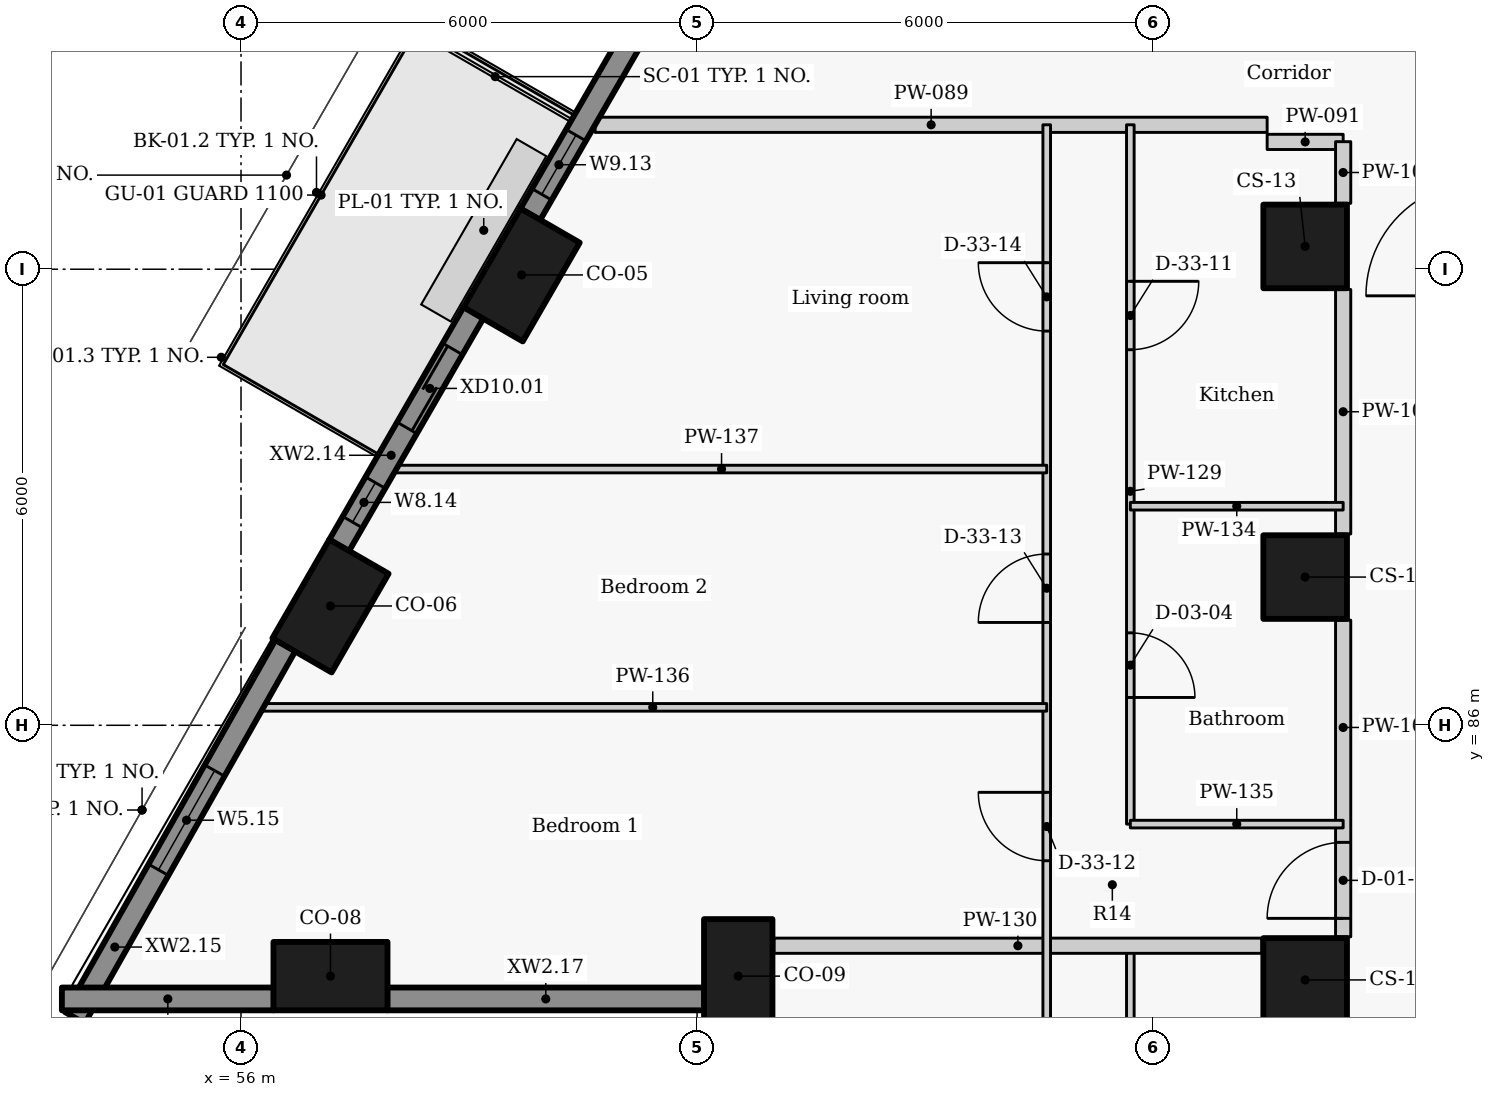
"""IFC4 building model, lengths in metres.
Left out: names, types, materials, properties, quantities, classifications, styles, units other than length and angle.
Written with IfcOpenShell. Run it as: python <this file> out.ifc"""

import sys

from ifc_helpers import new_model, si_unit, direction, frame, frame_2d, origin, origin_2d, place, context, subcontext, project, spatial, rectangle, extrude, element, fill, save


model = new_model("IFC4")
c1 = context("Model", 3, precision=1e-05, world=origin(), true_north=direction((0.0, 1.0)))
c2 = subcontext(c1, "Body", "Model", "MODEL_VIEW")
j1 = project(units=[si_unit("LENGTHUNIT", "METRE"), si_unit("PLANEANGLEUNIT", "RADIAN")], contexts=[c1])
p1 = place(None, origin())
s1 = spatial("IfcSite", under=j1, at=p1, CompositionType="ELEMENT")
p2 = place(p1, origin())
s2 = spatial("IfcBuilding", under=s1, at=p2, CompositionType="ELEMENT")
p3 = place(p2, frame((0.0, 0.0, 44.7)))
s3 = spatial("IfcBuildingStorey", under=s2, at=p3, CompositionType="ELEMENT", Elevation=44.7)
for number, where, z_axis, x_axis in (
    (1, (59.692, 91.925, 0.0), (0.0, 0.0, 1.0), (-0.5, -0.866, 0.0)),
    (2, (57.177, 87.57, 0.0), (0.0, 0.0, 1.0), (-0.5, -0.866, 0.0)),
    (3, (57.177, 82.7, 0.0), (0.0, 0.0, 1.0), (1.0, 0.0, 0.0)),
    (4, (62.542, 82.7, 0.0), (0.0, 0.0, 1.0), (0.0, -1.0, 0.0)),
):
    element("IfcColumn", number, at=place(p3, frame(where, z_axis=z_axis, x_axis=x_axis)), inside=s3, PredefinedType="COLUMN", context=c2, shape_type="SweptSolid", body=[
        extrude(rectangle(XDim=1.5, YDim=0.9, at=origin_2d()), origin(), (0.0, 0.0, 1.0), 3.3),
    ])
for number, where, z_axis, x_axis in (
    (5, (70.0, 92.3, 0.0), (0.0, 0.0, 1.0), (0.0, -1.0, 0.0)),
    (6, (70.0, 87.95, 0.0), (0.0, 0.0, 1.0), (0.0, -1.0, 0.0)),
    (7, (70.0, 82.65, 0.0), (0.0, 0.0, 1.0), (0.0, -1.0, 0.0)),
):
    element("IfcColumn", number, at=place(p3, frame(where, z_axis=z_axis, x_axis=x_axis)), inside=s3, PredefinedType="COLUMN", context=c2, shape_type="SweptSolid", body=[
        extrude(rectangle(XDim=1.1, YDim=1.1, at=origin_2d()), origin(), (0.0, 0.0, 1.0), 3.3),
    ])
p4 = place(p3, frame((61.722, 96.041, 0.0), z_axis=(0.0, 0.0, 1.0), x_axis=(-0.500001735503, -0.866024401789, 0.0)))
e8 = element("IfcWall", 8, at=p4, inside=s3, PredefinedType="SOLIDWALL", context=c2, shape_type="SweptSolid", body=[
    extrude(rectangle(XDim=3.834, YDim=0.3, at=frame_2d((1.917, 0.0))), origin(), (0.0, 0.0, 1.0), 2.425),
])
p5 = place(p4, frame((2.629, 0.0, 0.9)))
e9 = element("IfcOpeningElement", 9, at=p5, cuts=e8, PredefinedType="OPENING", context=c2, shape_type="SweptSolid", body=[
    extrude(rectangle(XDim=0.9, YDim=1.1, at=frame_2d((0.45, 0.55))), frame((0.0, 0.16, 0.0), z_axis=(0.0, -1.0, 0.0), x_axis=(1.0, 0.0, 0.0)), (0.0, 0.0, 1.0), 0.32),
])
p6 = place(p3, frame((59.059, 91.429, 0.0), z_axis=(0.0, 0.0, 1.0), x_axis=(-0.499977402622, -0.866038449993, 0.0)))
e10 = element("IfcWall", 10, at=p6, inside=s3, PredefinedType="SOLIDWALL", context=c2, shape_type="SweptSolid", body=[
    extrude(rectangle(XDim=3.537, YDim=0.3, at=frame_2d((1.769, 0.0))), origin(), (0.0, 0.0, 1.0), 2.425),
])
p7 = place(p6, frame((0.551, 0.0, 0.0)))
e11 = element("IfcOpeningElement", 11, at=p7, cuts=e10, PredefinedType="OPENING", context=c2, shape_type="SweptSolid", body=[
    extrude(rectangle(XDim=1.2, YDim=2.0, at=frame_2d((0.6, 1.0))), frame((0.0, 0.16, 0.0), z_axis=(0.0, -1.0, 0.0), x_axis=(1.0, 0.0, 0.0)), (0.0, 0.0, 1.0), 0.32),
])
p8 = place(p6, frame((2.582, 0.0, 0.9)))
e12 = element("IfcOpeningElement", 12, at=p8, cuts=e10, PredefinedType="OPENING", context=c2, shape_type="SweptSolid", body=[
    extrude(rectangle(XDim=0.6, YDim=1.1, at=frame_2d((0.3, 0.55))), frame((0.0, 0.16, 0.0), z_axis=(0.0, -1.0, 0.0), x_axis=(1.0, 0.0, 0.0)), (0.0, 0.0, 1.0), 0.32),
])
p9 = place(p3, frame((56.584, 87.051, 0.0), z_axis=(0.0, 0.0, 1.0), x_axis=(-0.492363204642, -0.870389840655, 0.0)))
e13 = element("IfcWall", 13, at=p9, inside=s3, PredefinedType="SOLIDWALL", context=c2, shape_type="SweptSolid", body=[
    extrude(rectangle(XDim=5.626, YDim=0.3, at=frame_2d((2.813, 0.0))), origin(), (0.0, 0.0, 1.0), 2.425),
])
p10 = place(p9, frame((1.892, 0.0, 0.9)))
e14 = element("IfcOpeningElement", 14, at=p10, cuts=e13, PredefinedType="OPENING", context=c2, shape_type="SweptSolid", body=[
    extrude(rectangle(XDim=1.5, YDim=1.1, at=frame_2d((0.75, 0.55))), frame((0.0, 0.16, 0.0), z_axis=(0.0, -1.0, 0.0), x_axis=(1.0, 0.0, 0.0)), (0.0, 0.0, 1.0), 0.32),
])
p11 = place(p3, frame((53.643, 82.4, 0.0), z_axis=(0.0, 0.0, 1.0), x_axis=(1.0, 0.0, 0.0)))
e15 = element("IfcWall", 15, at=p11, inside=s3, PredefinedType="SOLIDWALL", context=c2, shape_type="SweptSolid", body=[
    extrude(rectangle(XDim=2.788, YDim=0.3, at=frame_2d((1.394, 0.0))), origin(), (0.0, 0.0, 1.0), 2.425),
])
p12 = place(p3, frame((57.923, 82.4, 0.0), z_axis=(0.0, 0.0, 1.0), x_axis=(1.0, 0.0, 0.0)))
e16 = element("IfcWall", 16, at=p12, inside=s3, PredefinedType="SOLIDWALL", context=c2, shape_type="SweptSolid", body=[
    extrude(rectangle(XDim=4.173, YDim=0.3, at=frame_2d((2.086, 0.0))), origin(), (0.0, 0.0, 1.0), 2.425),
])
p13 = place(p3, frame((60.659, 93.9, 0.0), z_axis=(0.0, 0.0, 1.0), x_axis=(1.0, 0.0, 0.0)))
e17 = element("IfcWall", 17, at=p13, inside=s3, PredefinedType="PARTITIONING", context=c2, shape_type="SweptSolid", body=[
    extrude(rectangle(XDim=8.841, YDim=0.2, at=frame_2d((4.421, 0.0))), origin(), (0.0, 0.0, 1.0), 2.405),
])
p14 = place(p3, frame((69.5, 93.675, 0.0), z_axis=(0.0, 0.0, 1.0), x_axis=(1.0, 0.0, 0.0)))
e18 = element("IfcWall", 18, at=p14, inside=s3, PredefinedType="PARTITIONING", context=c2, shape_type="SweptSolid", body=[
    extrude(rectangle(XDim=1.0, YDim=0.2, at=frame_2d((0.5, 0.0))), origin(), (0.0, 0.0, 1.0), 2.505),
])
p15 = place(p3, frame((70.5, 83.217, 0.0), z_axis=(0.0, 0.0, 1.0), x_axis=(0.0, 1.0, 0.0)))
e19 = element("IfcWall", 19, at=p15, inside=s3, PredefinedType="PARTITIONING", context=c2, shape_type="SweptSolid", body=[
    extrude(rectangle(XDim=4.166, YDim=0.2, at=frame_2d((2.083, 0.0))), origin(), (0.0, 0.0, 1.0), 3.025),
])
p16 = place(p15, frame((0.243, 0.0, 0.0)))
e20 = element("IfcOpeningElement", 20, at=p16, cuts=e19, PredefinedType="OPENING", context=c2, shape_type="SweptSolid", body=[
    extrude(rectangle(XDim=1.0, YDim=2.1, at=frame_2d((0.5, 1.05))), frame((0.0, 0.11, 0.0), z_axis=(0.0, -1.0, 0.0), x_axis=(1.0, 0.0, 0.0)), (0.0, 0.0, 1.0), 0.22),
])
p17 = place(p3, frame((70.5, 88.517, 0.0), z_axis=(0.0, 0.0, 1.0), x_axis=(0.0, 1.0, 0.0)))
e21 = element("IfcWall", 21, at=p17, inside=s3, PredefinedType="PARTITIONING", context=c2, shape_type="SweptSolid", body=[
    extrude(rectangle(XDim=3.216, YDim=0.2, at=frame_2d((1.608, 0.0))), origin(), (0.0, 0.0, 1.0), 3.025),
])
p18 = place(p3, frame((70.5, 92.867, 0.0), z_axis=(0.0, 0.0, 1.0), x_axis=(0.0, 1.0, 0.0)))
e22 = element("IfcWall", 22, at=p18, inside=s3, PredefinedType="PARTITIONING", context=c2, shape_type="SweptSolid", body=[
    extrude(rectangle(XDim=0.811, YDim=0.2, at=frame_2d((0.406, 0.0))), origin(), (0.0, 0.0, 1.0), 3.025),
])
p19 = place(p3, frame((67.7, 83.1, 0.0), z_axis=(0.0, 0.0, 1.0), x_axis=(0.0, -1.0, 0.0)))
e23 = element("IfcWall", 23, at=p19, inside=s3, PredefinedType="PARTITIONING", context=c2, shape_type="SweptSolid", body=[
    extrude(rectangle(XDim=9.0, YDim=0.1, at=frame_2d((4.5, 0.0))), origin(), (0.0, 0.0, 1.0), 3.025),
])
p20 = place(p19, frame((6.53, 0.0, 0.0)))
e24 = element("IfcOpeningElement", 24, at=p20, cuts=e23, PredefinedType="OPENING", context=c2, shape_type="SweptSolid", body=[
    extrude(rectangle(XDim=0.85, YDim=2.1, at=frame_2d((0.425, 1.05))), frame((0.0, 0.06, 0.0), z_axis=(0.0, -1.0, 0.0), x_axis=(1.0, 0.0, 0.0)), (0.0, 0.0, 1.0), 0.12),
])
p21 = place(p19, frame((2.005, 0.0, 0.0)))
e25 = element("IfcOpeningElement", 25, at=p21, cuts=e23, PredefinedType="OPENING", context=c2, shape_type="SweptSolid", body=[
    extrude(rectangle(XDim=0.9, YDim=2.1, at=frame_2d((0.45, 1.05))), frame((0.0, 0.06, 0.0), z_axis=(0.0, -1.0, 0.0), x_axis=(1.0, 0.0, 0.0)), (0.0, 0.0, 1.0), 0.12),
])
p22 = place(p3, frame((67.7, 93.9, 0.0), z_axis=(0.0, 0.0, 1.0), x_axis=(0.0, -1.0, 0.0)))
e26 = element("IfcWall", 26, at=p22, inside=s3, PredefinedType="PARTITIONING", context=c2, shape_type="SweptSolid", body=[
    extrude(rectangle(XDim=9.2, YDim=0.1, at=frame_2d((4.6, 0.0))), origin(), (0.0, 0.0, 1.0), 3.025),
])
p23 = place(p22, frame((6.684, 0.0, 0.0)))
e27 = element("IfcOpeningElement", 27, at=p23, cuts=e26, PredefinedType="OPENING", context=c2, shape_type="SweptSolid", body=[
    extrude(rectangle(XDim=0.85, YDim=2.1, at=frame_2d((0.425, 1.05))), frame((0.0, 0.06, 0.0), z_axis=(0.0, -1.0, 0.0), x_axis=(1.0, 0.0, 0.0)), (0.0, 0.0, 1.0), 0.12),
])
p24 = place(p22, frame((2.059, 0.0, 0.0)))
e28 = element("IfcOpeningElement", 28, at=p24, cuts=e26, PredefinedType="OPENING", context=c2, shape_type="SweptSolid", body=[
    extrude(rectangle(XDim=0.9, YDim=2.1, at=frame_2d((0.45, 1.05))), frame((0.0, 0.06, 0.0), z_axis=(0.0, -1.0, 0.0), x_axis=(1.0, 0.0, 0.0)), (0.0, 0.0, 1.0), 0.12),
])
p25 = place(p3, frame((63.012, 83.1, 0.0), z_axis=(0.0, 0.0, 1.0), x_axis=(1.0, 0.0, 0.0)))
e29 = element("IfcWall", 29, at=p25, inside=s3, PredefinedType="PARTITIONING", context=c2, shape_type="SweptSolid", body=[
    extrude(rectangle(XDim=6.418, YDim=0.2, at=frame_2d((3.209, 0.0))), origin(), (0.0, 0.0, 1.0), 3.025),
])
p26 = place(p3, frame((66.6, 72.0, 0.0), z_axis=(0.0, 0.0, 1.0), x_axis=(0.0, 1.0, 0.0)))
e30 = element("IfcWall", 30, at=p26, inside=s3, PredefinedType="PARTITIONING", context=c2, shape_type="SweptSolid", body=[
    extrude(rectangle(XDim=21.9, YDim=0.1, at=frame_2d((10.95, 0.0))), origin(), (0.0, 0.0, 1.0), 3.025),
])
p27 = place(p26, frame((1.161, 0.0, 0.0)))
e31 = element("IfcOpeningElement", 31, at=p27, cuts=e30, PredefinedType="OPENING", context=c2, shape_type="SweptSolid", body=[
    extrude(rectangle(XDim=0.9, YDim=2.1, at=frame_2d((0.45, 1.05))), frame((0.0, 0.06, 0.0), z_axis=(0.0, -1.0, 0.0), x_axis=(1.0, 0.0, 0.0)), (0.0, 0.0, 1.0), 0.12),
])
p28 = place(p26, frame((4.384, 0.0, 0.0)))
e32 = element("IfcOpeningElement", 32, at=p28, cuts=e30, PredefinedType="OPENING", context=c2, shape_type="SweptSolid", body=[
    extrude(rectangle(XDim=0.9, YDim=2.1, at=frame_2d((0.45, 1.05))), frame((0.0, 0.06, 0.0), z_axis=(0.0, -1.0, 0.0), x_axis=(1.0, 0.0, 0.0)), (0.0, 0.0, 1.0), 0.12),
])
p29 = place(p26, frame((8.323, 0.0, 0.0)))
e33 = element("IfcOpeningElement", 33, at=p29, cuts=e30, PredefinedType="OPENING", context=c2, shape_type="SweptSolid", body=[
    extrude(rectangle(XDim=0.9, YDim=2.1, at=frame_2d((0.45, 1.05))), frame((0.0, 0.06, 0.0), z_axis=(0.0, -1.0, 0.0), x_axis=(1.0, 0.0, 0.0)), (0.0, 0.0, 1.0), 0.12),
])
p30 = place(p26, frame((12.218, 0.0, 0.0)))
e34 = element("IfcOpeningElement", 34, at=p30, cuts=e30, PredefinedType="OPENING", context=c2, shape_type="SweptSolid", body=[
    extrude(rectangle(XDim=0.9, YDim=2.1, at=frame_2d((0.45, 1.05))), frame((0.0, 0.06, 0.0), z_axis=(0.0, -1.0, 0.0), x_axis=(1.0, 0.0, 0.0)), (0.0, 0.0, 1.0), 0.12),
])
p31 = place(p26, frame((15.353, 0.0, 0.0)))
e35 = element("IfcOpeningElement", 35, at=p31, cuts=e30, PredefinedType="OPENING", context=c2, shape_type="SweptSolid", body=[
    extrude(rectangle(XDim=0.9, YDim=2.1, at=frame_2d((0.45, 1.05))), frame((0.0, 0.06, 0.0), z_axis=(0.0, -1.0, 0.0), x_axis=(1.0, 0.0, 0.0)), (0.0, 0.0, 1.0), 0.12),
])
p32 = place(p26, frame((19.186, 0.0, 0.0)))
e36 = element("IfcOpeningElement", 36, at=p32, cuts=e30, PredefinedType="OPENING", context=c2, shape_type="SweptSolid", body=[
    extrude(rectangle(XDim=0.9, YDim=2.1, at=frame_2d((0.45, 1.05))), frame((0.0, 0.06, 0.0), z_axis=(0.0, -1.0, 0.0), x_axis=(1.0, 0.0, 0.0)), (0.0, 0.0, 1.0), 0.12),
])
for number, where, z_axis, x_axis in (
    (37, (67.7, 88.882, 0.0), (0.0, 0.0, 1.0), (1.0, 0.0, 0.0)),
    (38, (67.7, 84.7, 0.0), (0.0, 0.0, 1.0), (1.0, 0.0, 0.0)),
):
    element("IfcWall", number, at=place(p3, frame(where, z_axis=z_axis, x_axis=x_axis)), inside=s3, PredefinedType="PARTITIONING", context=c2, shape_type="SweptSolid", body=[
        extrude(rectangle(XDim=2.8, YDim=0.1, at=frame_2d((1.4, 0.0))), origin(), (0.0, 0.0, 1.0), 2.505),
    ])
p33 = place(p3, frame((56.234, 86.236, 0.0), z_axis=(0.0, 0.0, 1.0), x_axis=(1.0, 0.0, 0.0)))
e39 = element("IfcWall", 39, at=p33, inside=s3, PredefinedType="PARTITIONING", context=c2, shape_type="SweptSolid", body=[
    extrude(rectangle(XDim=10.366, YDim=0.1, at=frame_2d((5.183, 0.0))), origin(), (0.0, 0.0, 1.0), 2.405),
])
p34 = place(p3, frame((58.044, 89.371, 0.0), z_axis=(0.0, 0.0, 1.0), x_axis=(1.0, 0.0, 0.0)))
e40 = element("IfcWall", 40, at=p34, inside=s3, PredefinedType="PARTITIONING", context=c2, shape_type="SweptSolid", body=[
    extrude(rectangle(XDim=8.556, YDim=0.1, at=frame_2d((4.278, 0.0))), origin(), (0.0, 0.0, 1.0), 2.405),
])
p35 = place(p5, origin())
e41 = element("IfcWindow", 41, at=p35, inside=s3, PartitioningType="SINGLE_PANEL", PredefinedType="WINDOW", context=c2, shape_type="SweptSolid", body=[
    extrude(rectangle(XDim=0.9, YDim=1.1, at=frame_2d((0.45, 0.55))), frame((0.0, 0.03, 0.0), z_axis=(0.0, -1.0, 0.0), x_axis=(1.0, 0.0, 0.0)), (0.0, 0.0, 1.0), 0.06),
])
fill(e9, e41)
p36 = place(p7, origin())
e42 = element("IfcDoor", 42, at=p36, inside=s3, OperationType="SLIDING_TO_LEFT", PredefinedType="DOOR", context=c2, shape_type="SweptSolid", body=[
    extrude(rectangle(XDim=1.2, YDim=2.0, at=frame_2d((0.6, 1.0))), frame((0.0, 0.025, 0.0), z_axis=(0.0, -1.0, 0.0), x_axis=(1.0, 0.0, 0.0)), (0.0, 0.0, 1.0), 0.05),
])
fill(e11, e42)
p37 = place(p8, origin())
e43 = element("IfcWindow", 43, at=p37, inside=s3, PartitioningType="SINGLE_PANEL", PredefinedType="WINDOW", context=c2, shape_type="SweptSolid", body=[
    extrude(rectangle(XDim=0.6, YDim=1.1, at=frame_2d((0.3, 0.55))), frame((0.0, 0.03, 0.0), z_axis=(0.0, -1.0, 0.0), x_axis=(1.0, 0.0, 0.0)), (0.0, 0.0, 1.0), 0.06),
])
fill(e12, e43)
p38 = place(p10, origin())
e44 = element("IfcWindow", 44, at=p38, inside=s3, PartitioningType="SINGLE_PANEL", PredefinedType="WINDOW", context=c2, shape_type="SweptSolid", body=[
    extrude(rectangle(XDim=1.5, YDim=1.1, at=frame_2d((0.75, 0.55))), frame((0.0, 0.03, 0.0), z_axis=(0.0, -1.0, 0.0), x_axis=(1.0, 0.0, 0.0)), (0.0, 0.0, 1.0), 0.06),
])
fill(e14, e44)
p39 = place(p16, origin())
e45 = element("IfcDoor", 45, at=p39, inside=s3, OperationType="SINGLE_SWING_LEFT", PredefinedType="DOOR", context=c2, shape_type="SweptSolid", body=[
    extrude(rectangle(XDim=1.0, YDim=2.1, at=frame_2d((0.5, 1.05))), frame((0.0, 0.025, 0.0), z_axis=(0.0, -1.0, 0.0), x_axis=(1.0, 0.0, 0.0)), (0.0, 0.0, 1.0), 0.05),
])
fill(e20, e45)
p40 = place(p23, origin())
e46 = element("IfcDoor", 46, at=p40, inside=s3, OperationType="SINGLE_SWING_RIGHT", PredefinedType="DOOR", context=c2, shape_type="SweptSolid", body=[
    extrude(rectangle(XDim=0.85, YDim=2.1, at=frame_2d((0.425, 1.05))), frame((0.0, 0.025, 0.0), z_axis=(0.0, -1.0, 0.0), x_axis=(1.0, 0.0, 0.0)), (0.0, 0.0, 1.0), 0.05),
])
fill(e27, e46)
p41 = place(p24, origin())
e47 = element("IfcDoor", 47, at=p41, inside=s3, OperationType="SINGLE_SWING_LEFT", PredefinedType="DOOR", context=c2, shape_type="SweptSolid", body=[
    extrude(rectangle(XDim=0.9, YDim=2.1, at=frame_2d((0.45, 1.05))), frame((0.0, 0.025, 0.0), z_axis=(0.0, -1.0, 0.0), x_axis=(1.0, 0.0, 0.0)), (0.0, 0.0, 1.0), 0.05),
])
fill(e28, e47)
p42 = place(p30, origin())
e48 = element("IfcDoor", 48, at=p42, inside=s3, OperationType="SINGLE_SWING_RIGHT", PredefinedType="DOOR", context=c2, shape_type="SweptSolid", body=[
    extrude(rectangle(XDim=0.9, YDim=2.1, at=frame_2d((0.45, 1.05))), frame((0.0, 0.025, 0.0), z_axis=(0.0, -1.0, 0.0), x_axis=(1.0, 0.0, 0.0)), (0.0, 0.0, 1.0), 0.05),
])
fill(e34, e48)
p43 = place(p31, origin())
e49 = element("IfcDoor", 49, at=p43, inside=s3, OperationType="SINGLE_SWING_LEFT", PredefinedType="DOOR", context=c2, shape_type="SweptSolid", body=[
    extrude(rectangle(XDim=0.9, YDim=2.1, at=frame_2d((0.45, 1.05))), frame((0.0, 0.025, 0.0), z_axis=(0.0, -1.0, 0.0), x_axis=(1.0, 0.0, 0.0)), (0.0, 0.0, 1.0), 0.05),
])
fill(e35, e49)
p44 = place(p32, origin())
e50 = element("IfcDoor", 50, at=p44, inside=s3, OperationType="SINGLE_SWING_RIGHT", PredefinedType="DOOR", context=c2, shape_type="SweptSolid", body=[
    extrude(rectangle(XDim=0.9, YDim=2.1, at=frame_2d((0.45, 1.05))), frame((0.0, 0.025, 0.0), z_axis=(0.0, -1.0, 0.0), x_axis=(1.0, 0.0, 0.0)), (0.0, 0.0, 1.0), 0.05),
])
fill(e36, e50)
save(model, sys.argv[1])
